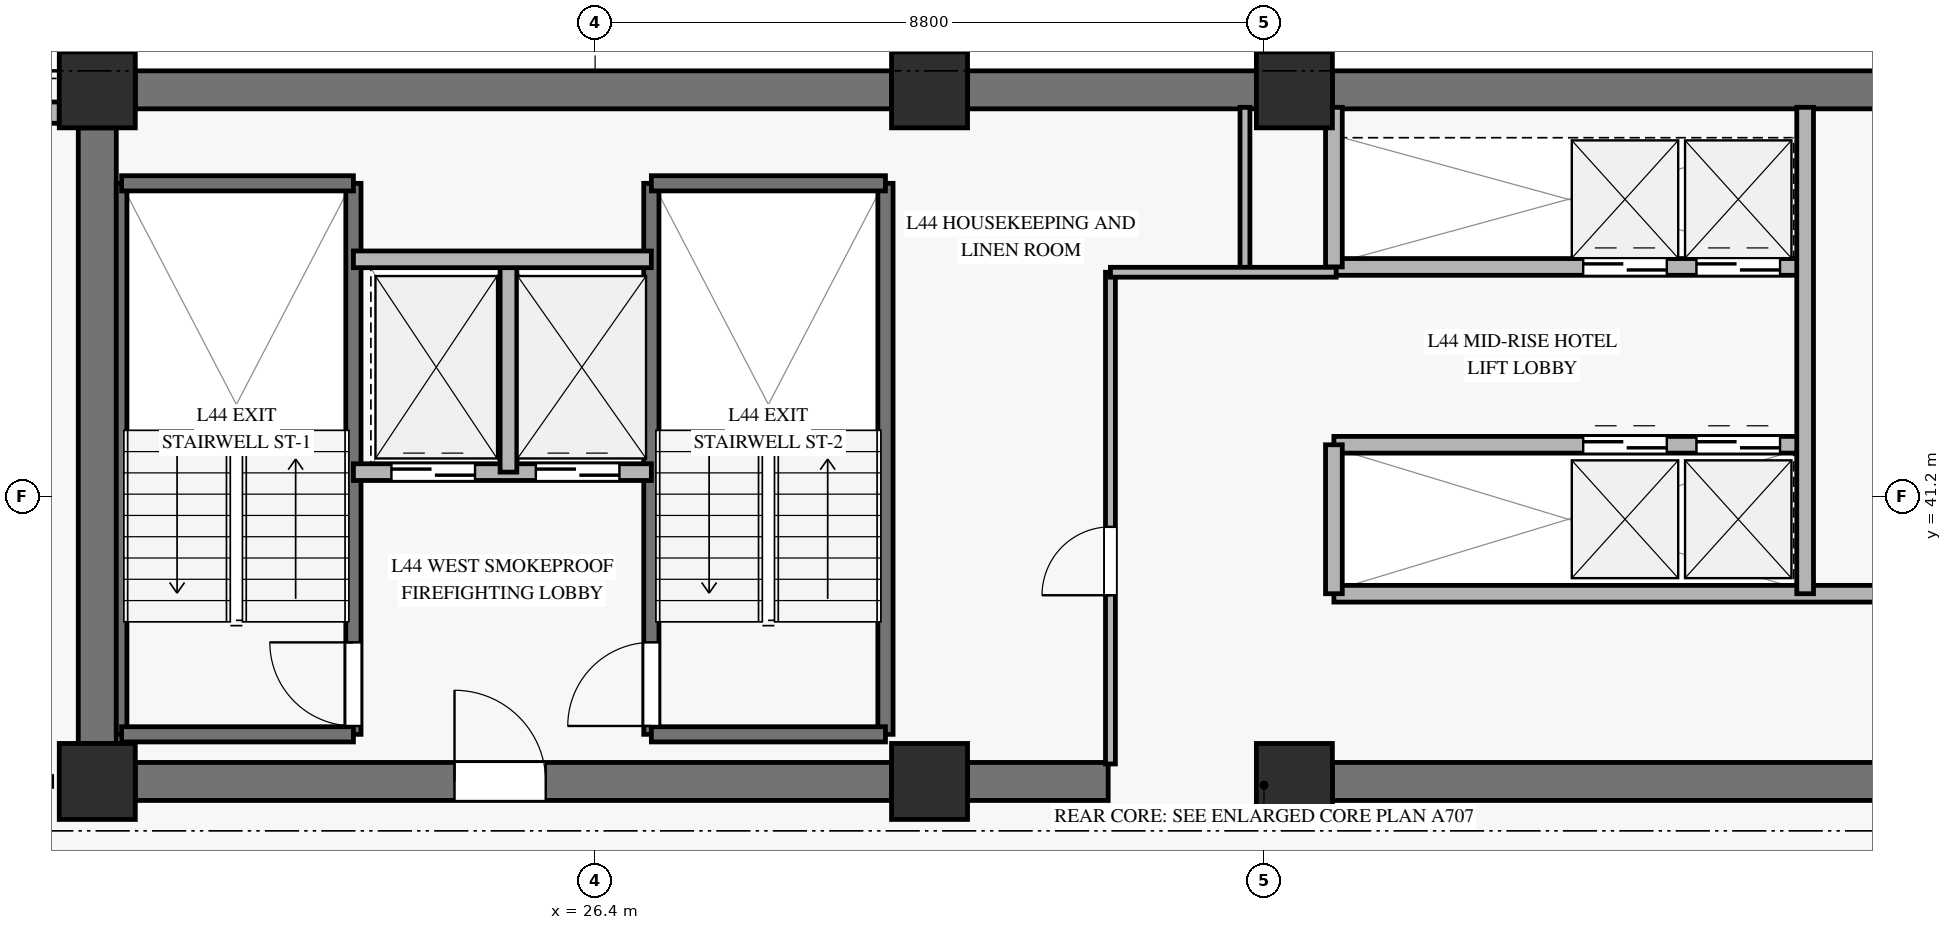
"""IFC4 building model, lengths in metres.
Left out: names, types, materials, properties, quantities, classifications, styles, units other than length and angle.
Written with IfcOpenShell. Run it as: python <this file> out.ifc"""

import sys

from ifc_helpers import new_model, si_unit, direction, frame, frame_2d, origin, origin_2d, place, context, subcontext, project, spatial, rectangle, extrude, source, transform, mapped, element, fill, save


model = new_model("IFC4")
c1 = context("Model", 3, precision=1e-05, world=origin(), true_north=direction((0.0, 1.0)))
c2 = subcontext(c1, "Body", "Model", "MODEL_VIEW")
j1 = project(units=[si_unit("LENGTHUNIT", "METRE"), si_unit("PLANEANGLEUNIT", "RADIAN")], contexts=[c1])
p1 = place(None, origin())
s1 = spatial("IfcSite", under=j1, at=p1, CompositionType="ELEMENT")
p2 = place(p1, origin())
s2 = spatial("IfcBuilding", under=s1, at=p2, CompositionType="ELEMENT")
p3 = place(p2, frame((0.0, 0.0, 177.2)))
s3 = spatial("IfcBuildingStorey", under=s2, at=p3, CompositionType="ELEMENT", Elevation=177.2)
m1 = source(origin(), c2, "Body", "SweptSolid", [
    extrude(rectangle(XDim=1.0, YDim=1.0, at=origin_2d()), origin(), (0.0, 0.0, 1.0), 3.27),
])
for number, where, z_axis, x_axis in (
    (1, (19.85, 37.45, 0.0), (0.0, 0.0, 1.0), (1.0, 0.0, 0.0)),
    (2, (19.85, 46.55, 0.0), (0.0, 0.0, 1.0), (1.0, 0.0, 0.0)),
    (3, (30.8, 37.45, 0.0), (0.0, 0.0, 1.0), (1.0, 0.0, 0.0)),
    (4, (30.8, 46.55, 0.0), (0.0, 0.0, 1.0), (1.0, 0.0, 0.0)),
    (5, (35.6, 37.45, 0.0), (0.0, 0.0, 1.0), (1.0, 0.0, 0.0)),
    (6, (35.6, 46.55, 0.0), (0.0, 0.0, 1.0), (1.0, 0.0, 0.0)),
):
    element("IfcColumn", number, at=place(p3, frame(where, z_axis=z_axis, x_axis=x_axis)), inside=s3, PredefinedType="PILASTER", context=c2, shape_type="MappedRepresentation", body=[
        mapped(m1, transform((0.0, 0.0, 0.0), x_axis=(1.0, 0.0, 0.0), y_axis=(0.0, 1.0, 0.0), z_axis=(0.0, 0.0, 1.0), scale=1.0)),
    ])
p4 = place(p3, frame((20.35, 46.55, 0.0), z_axis=(0.0, 0.0, 1.0), x_axis=(1.0, 0.0, 0.0)))
e7 = element("IfcWall", 7, at=p4, inside=s3, PredefinedType="SHEAR", context=c2, shape_type="SweptSolid", body=[
    extrude(rectangle(XDim=9.95, YDim=0.5, at=frame_2d((4.975, 0.0))), origin(), (0.0, 0.0, 1.0), 3.27),
])
p5 = place(p3, frame((31.3, 46.55, 0.0), z_axis=(0.0, 0.0, 1.0), x_axis=(1.0, 0.0, 0.0)))
e8 = element("IfcWall", 8, at=p5, inside=s3, PredefinedType="SHEAR", context=c2, shape_type="SweptSolid", body=[
    extrude(rectangle(XDim=3.8, YDim=0.5, at=frame_2d((1.9, 0.0))), origin(), (0.0, 0.0, 1.0), 3.27),
])
p6 = place(p3, frame((36.1, 46.55, 0.0), z_axis=(0.0, 0.0, 1.0), x_axis=(1.0, 0.0, 0.0)))
e9 = element("IfcWall", 9, at=p6, inside=s3, PredefinedType="SHEAR", context=c2, shape_type="SweptSolid", body=[
    extrude(rectangle(XDim=7.7, YDim=0.5, at=frame_2d((3.85, 0.0))), origin(), (0.0, 0.0, 1.0), 3.27),
])
p7 = place(p3, frame((20.35, 37.45, 0.0), z_axis=(0.0, 0.0, 1.0), x_axis=(1.0, 0.0, 0.0)))
e10 = element("IfcWall", 10, at=p7, inside=s3, PredefinedType="SHEAR", context=c2, shape_type="SweptSolid", body=[
    extrude(rectangle(XDim=9.95, YDim=0.5, at=frame_2d((4.975, 0.0))), origin(), (0.0, 0.0, 1.0), 3.27),
])
p8 = place(p7, frame((4.2, 0.0, 0.0)))
e11 = element("IfcOpeningElement", 11, at=p8, cuts=e10, PredefinedType="OPENING", context=c2, shape_type="SweptSolid", body=[
    extrude(rectangle(XDim=1.2, YDim=2.15, at=frame_2d((0.6, 1.075))), frame((0.0, 0.26, 0.0), z_axis=(0.0, -1.0, 0.0), x_axis=(1.0, 0.0, 0.0)), (0.0, 0.0, 1.0), 0.52),
])
p9 = place(p3, frame((31.3, 37.45, 0.0), z_axis=(0.0, 0.0, 1.0), x_axis=(1.0, 0.0, 0.0)))
e12 = element("IfcWall", 12, at=p9, inside=s3, PredefinedType="SHEAR", context=c2, shape_type="SweptSolid", body=[
    extrude(rectangle(XDim=1.85, YDim=0.5, at=frame_2d((0.925, 0.0))), origin(), (0.0, 0.0, 1.0), 3.27),
])
p10 = place(p3, frame((36.1, 37.45, 0.0), z_axis=(0.0, 0.0, 1.0), x_axis=(1.0, 0.0, 0.0)))
e13 = element("IfcWall", 13, at=p10, inside=s3, PredefinedType="SHEAR", context=c2, shape_type="SweptSolid", body=[
    extrude(rectangle(XDim=7.7, YDim=0.5, at=frame_2d((3.85, 0.0))), origin(), (0.0, 0.0, 1.0), 3.27),
])
p11 = place(p3, frame((19.85, 37.95, 0.0), z_axis=(0.0, 0.0, 1.0), x_axis=(0.0, 1.0, 0.0)))
e14 = element("IfcWall", 14, at=p11, inside=s3, PredefinedType="SHEAR", context=c2, shape_type="SweptSolid", body=[
    extrude(rectangle(XDim=8.1, YDim=0.5, at=frame_2d((4.05, 0.0))), origin(), (0.0, 0.0, 1.0), 3.27),
])
p12 = place(p3, frame((9.156, 46.25, 0.0), z_axis=(0.0, 0.0, 1.0), x_axis=(1.0, 0.0, 0.0)))
e15 = element("IfcWall", 15, at=p12, inside=s3, PredefinedType="SOLIDWALL", context=c2, shape_type="SweptSolid", body=[
    extrude(rectangle(XDim=10.194, YDim=0.28, at=frame_2d((5.097, 0.0))), origin(), (0.0, 0.0, 1.0), 2.75),
])
p13 = place(p12, frame((4.297, 0.0, 0.45)))
e16 = element("IfcOpeningElement", 16, at=p13, cuts=e15, PredefinedType="OPENING", context=c2, shape_type="SweptSolid", body=[
    extrude(rectangle(XDim=1.6, YDim=2.0, at=frame_2d((0.8, 1.0))), frame((0.0, 0.15, 0.0), z_axis=(0.0, -1.0, 0.0), x_axis=(1.0, 0.0, 0.0)), (0.0, 0.0, 1.0), 0.3),
])
p14 = place(p3, frame((20.17, 38.07, 0.0), z_axis=(0.0, 0.0, 1.0), x_axis=(0.0, 1.0, 0.0)))
e17 = element("IfcWall", 17, at=p14, inside=s3, PredefinedType="SOLIDWALL", context=c2, shape_type="SweptSolid", body=[
    extrude(rectangle(XDim=7.25, YDim=0.14, at=frame_2d((3.625, 0.0))), origin(), (0.0, 0.0, 1.0), 3.5),
])
p15 = place(p3, frame((23.22, 38.07, 0.0), z_axis=(0.0, 0.0, 1.0), x_axis=(0.0, 1.0, 0.0)))
e18 = element("IfcWall", 18, at=p15, inside=s3, PredefinedType="SOLIDWALL", context=c2, shape_type="SweptSolid", body=[
    extrude(rectangle(XDim=7.25, YDim=0.2, at=frame_2d((3.625, 0.0))), origin(), (0.0, 0.0, 1.0), 3.5),
])
p16 = place(p15, frame((0.11, 0.0, 0.0)))
e19 = element("IfcOpeningElement", 19, at=p16, cuts=e18, PredefinedType="OPENING", context=c2, shape_type="SweptSolid", body=[
    extrude(rectangle(XDim=1.1, YDim=2.15, at=frame_2d((0.55, 1.075))), frame((0.0, 0.11, 0.0), z_axis=(0.0, -1.0, 0.0), x_axis=(1.0, 0.0, 0.0)), (0.0, 0.0, 1.0), 0.22),
])
for number, where, z_axis, x_axis in (
    (20, (20.17, 45.32, 0.0), (0.0, 0.0, 1.0), (1.0, 0.0, 0.0)),
    (21, (20.17, 38.07, 0.0), (0.0, 0.0, 1.0), (1.0, 0.0, 0.0)),
):
    element("IfcWall", number, at=place(p3, frame(where, z_axis=z_axis, x_axis=x_axis)), inside=s3, PredefinedType="SOLIDWALL", context=c2, shape_type="SweptSolid", body=[
        extrude(rectangle(XDim=3.05, YDim=0.2, at=frame_2d((1.525, 0.0))), origin(), (0.0, 0.0, 1.0), 3.5),
    ])
p17 = place(p3, frame((27.14, 38.07, 0.0), z_axis=(0.0, 0.0, 1.0), x_axis=(0.0, 1.0, 0.0)))
e22 = element("IfcWall", 22, at=p17, inside=s3, PredefinedType="SOLIDWALL", context=c2, shape_type="SweptSolid", body=[
    extrude(rectangle(XDim=7.25, YDim=0.2, at=frame_2d((3.625, 0.0))), origin(), (0.0, 0.0, 1.0), 3.5),
])
p18 = place(p17, frame((0.11, 0.0, 0.0)))
e23 = element("IfcOpeningElement", 23, at=p18, cuts=e22, PredefinedType="OPENING", context=c2, shape_type="SweptSolid", body=[
    extrude(rectangle(XDim=1.1, YDim=2.15, at=frame_2d((0.55, 1.075))), frame((0.0, 0.11, 0.0), z_axis=(0.0, -1.0, 0.0), x_axis=(1.0, 0.0, 0.0)), (0.0, 0.0, 1.0), 0.22),
])
p19 = place(p3, frame((30.22, 38.07, 0.0), z_axis=(0.0, 0.0, 1.0), x_axis=(0.0, 1.0, 0.0)))
e24 = element("IfcWall", 24, at=p19, inside=s3, PredefinedType="SOLIDWALL", context=c2, shape_type="SweptSolid", body=[
    extrude(rectangle(XDim=7.25, YDim=0.2, at=frame_2d((3.625, 0.0))), origin(), (0.0, 0.0, 1.0), 3.5),
])
for number, where, z_axis, x_axis in (
    (25, (27.14, 45.32, 0.0), (0.0, 0.0, 1.0), (1.0, 0.0, 0.0)),
    (26, (27.14, 38.07, 0.0), (0.0, 0.0, 1.0), (1.0, 0.0, 0.0)),
):
    element("IfcWall", number, at=place(p3, frame(where, z_axis=z_axis, x_axis=x_axis)), inside=s3, PredefinedType="SOLIDWALL", context=c2, shape_type="SweptSolid", body=[
        extrude(rectangle(XDim=3.08, YDim=0.2, at=frame_2d((1.54, 0.0))), origin(), (0.0, 0.0, 1.0), 3.5),
    ])
p20 = place(p3, frame((23.22, 41.52, 0.0), z_axis=(0.0, 0.0, 1.0), x_axis=(1.0, 0.0, 0.0)))
e27 = element("IfcWall", 27, at=p20, inside=s3, PredefinedType="SOLIDWALL", context=c2, shape_type="SweptSolid", body=[
    extrude(rectangle(XDim=3.92, YDim=0.22, at=frame_2d((1.96, 0.0))), origin(), (0.0, 0.0, 1.0), 3.27),
])
p21 = place(p20, frame((0.5, 0.0, 0.0)))
e28 = element("IfcOpeningElement", 28, at=p21, cuts=e27, PredefinedType="OPENING", context=c2, shape_type="SweptSolid", body=[
    extrude(rectangle(XDim=1.1, YDim=2.2, at=frame_2d((0.55, 1.1))), frame((0.0, 0.12, 0.0), z_axis=(0.0, -1.0, 0.0), x_axis=(1.0, 0.0, 0.0)), (0.0, 0.0, 1.0), 0.24),
])
p22 = place(p20, frame((2.4, 0.0, 0.0)))
e29 = element("IfcOpeningElement", 29, at=p22, cuts=e27, PredefinedType="OPENING", context=c2, shape_type="SweptSolid", body=[
    extrude(rectangle(XDim=1.1, YDim=2.2, at=frame_2d((0.55, 1.1))), frame((0.0, 0.12, 0.0), z_axis=(0.0, -1.0, 0.0), x_axis=(1.0, 0.0, 0.0)), (0.0, 0.0, 1.0), 0.24),
])
p23 = place(p3, frame((25.26, 41.52, 0.0), z_axis=(0.0, 0.0, 1.0), x_axis=(0.0, 1.0, 0.0)))
e30 = element("IfcWall", 30, at=p23, inside=s3, PredefinedType="SOLIDWALL", context=c2, shape_type="SweptSolid", body=[
    extrude(rectangle(XDim=2.8, YDim=0.22, at=frame_2d((1.4, 0.0))), origin(), (0.0, 0.0, 1.0), 3.27),
])
p24 = place(p3, frame((23.22, 44.32, 0.0), z_axis=(0.0, 0.0, 1.0), x_axis=(1.0, 0.0, 0.0)))
e31 = element("IfcWall", 31, at=p24, inside=s3, PredefinedType="SOLIDWALL", context=c2, shape_type="SweptSolid", body=[
    extrude(rectangle(XDim=3.92, YDim=0.22, at=frame_2d((1.96, 0.0))), origin(), (0.0, 0.0, 1.0), 3.27),
])
p25 = place(p3, frame((36.12, 44.22, 0.0), z_axis=(0.0, 0.0, 1.0), x_axis=(1.0, 0.0, 0.0)))
e32 = element("IfcWall", 32, at=p25, inside=s3, PredefinedType="SOLIDWALL", context=c2, shape_type="SweptSolid", body=[
    extrude(rectangle(XDim=6.2, YDim=0.22, at=frame_2d((3.1, 0.0))), origin(), (0.0, 0.0, 1.0), 3.27),
])
p26 = place(p25, frame((3.28, 0.0, 0.0)))
e33 = element("IfcOpeningElement", 33, at=p26, cuts=e32, PredefinedType="OPENING", context=c2, shape_type="SweptSolid", body=[
    extrude(rectangle(XDim=1.1, YDim=2.2, at=frame_2d((0.55, 1.1))), frame((0.0, 0.12, 0.0), z_axis=(0.0, -1.0, 0.0), x_axis=(1.0, 0.0, 0.0)), (0.0, 0.0, 1.0), 0.24),
])
p27 = place(p25, frame((4.77, 0.0, 0.0)))
e34 = element("IfcOpeningElement", 34, at=p27, cuts=e32, PredefinedType="OPENING", context=c2, shape_type="SweptSolid", body=[
    extrude(rectangle(XDim=1.1, YDim=2.2, at=frame_2d((0.55, 1.1))), frame((0.0, 0.12, 0.0), z_axis=(0.0, -1.0, 0.0), x_axis=(1.0, 0.0, 0.0)), (0.0, 0.0, 1.0), 0.24),
])
p28 = place(p3, frame((36.12, 41.88, 0.0), z_axis=(0.0, 0.0, 1.0), x_axis=(1.0, 0.0, 0.0)))
e35 = element("IfcWall", 35, at=p28, inside=s3, PredefinedType="SOLIDWALL", context=c2, shape_type="SweptSolid", body=[
    extrude(rectangle(XDim=6.2, YDim=0.22, at=frame_2d((3.1, 0.0))), origin(), (0.0, 0.0, 1.0), 3.27),
])
p29 = place(p28, frame((3.28, 0.0, 0.0)))
e36 = element("IfcOpeningElement", 36, at=p29, cuts=e35, PredefinedType="OPENING", context=c2, shape_type="SweptSolid", body=[
    extrude(rectangle(XDim=1.1, YDim=2.2, at=frame_2d((0.55, 1.1))), frame((0.0, 0.12, 0.0), z_axis=(0.0, -1.0, 0.0), x_axis=(1.0, 0.0, 0.0)), (0.0, 0.0, 1.0), 0.24),
])
p30 = place(p28, frame((4.77, 0.0, 0.0)))
e37 = element("IfcOpeningElement", 37, at=p30, cuts=e35, PredefinedType="OPENING", context=c2, shape_type="SweptSolid", body=[
    extrude(rectangle(XDim=1.1, YDim=2.2, at=frame_2d((0.55, 1.1))), frame((0.0, 0.12, 0.0), z_axis=(0.0, -1.0, 0.0), x_axis=(1.0, 0.0, 0.0)), (0.0, 0.0, 1.0), 0.24),
])
p31 = place(p3, frame((36.12, 39.92, 0.0), z_axis=(0.0, 0.0, 1.0), x_axis=(1.0, 0.0, 0.0)))
e38 = element("IfcWall", 38, at=p31, inside=s3, PredefinedType="SOLIDWALL", context=c2, shape_type="SweptSolid", body=[
    extrude(rectangle(XDim=8.6, YDim=0.22, at=frame_2d((4.3, 0.0))), origin(), (0.0, 0.0, 1.0), 2.555),
])
p32 = place(p3, frame((42.32, 39.92, 0.0), z_axis=(0.0, 0.0, 1.0), x_axis=(0.0, 1.0, 0.0)))
e39 = element("IfcWall", 39, at=p32, inside=s3, PredefinedType="SOLIDWALL", context=c2, shape_type="SweptSolid", body=[
    extrude(rectangle(XDim=6.4, YDim=0.22, at=frame_2d((3.2, 0.0))), origin(), (0.0, 0.0, 1.0), 3.27),
])
p33 = place(p3, frame((36.12, 39.92, 0.0), z_axis=(0.0, 0.0, 1.0), x_axis=(0.0, 1.0, 0.0)))
e40 = element("IfcWall", 40, at=p33, inside=s3, PredefinedType="SOLIDWALL", context=c2, shape_type="SweptSolid", body=[
    extrude(rectangle(XDim=1.96, YDim=0.22, at=frame_2d((0.98, 0.0))), origin(), (0.0, 0.0, 1.0), 3.27),
])
p34 = place(p3, frame((36.12, 44.22, 0.0), z_axis=(0.0, 0.0, 1.0), x_axis=(0.0, 1.0, 0.0)))
e41 = element("IfcWall", 41, at=p34, inside=s3, PredefinedType="SOLIDWALL", context=c2, shape_type="SweptSolid", body=[
    extrude(rectangle(XDim=2.1, YDim=0.22, at=frame_2d((1.05, 0.0))), origin(), (0.0, 0.0, 1.0), 3.27),
])
p35 = place(p3, frame((33.18, 37.68, 0.0), z_axis=(0.0, 0.0, 1.0), x_axis=(0.0, 1.0, 0.0)))
e42 = element("IfcWall", 42, at=p35, inside=s3, PredefinedType="PARTITIONING", context=c2, shape_type="SweptSolid", body=[
    extrude(rectangle(XDim=6.47, YDim=0.13, at=frame_2d((3.235, 0.0))), origin(), (0.0, 0.0, 1.0), 2.355),
])
p36 = place(p35, frame((2.22, 0.0, 0.0)))
e43 = element("IfcOpeningElement", 43, at=p36, cuts=e42, PredefinedType="OPENING", context=c2, shape_type="SweptSolid", body=[
    extrude(rectangle(XDim=0.9, YDim=2.1, at=frame_2d((0.45, 1.05))), frame((0.0, 0.075, 0.0), z_axis=(0.0, -1.0, 0.0), x_axis=(1.0, 0.0, 0.0)), (0.0, 0.0, 1.0), 0.15),
])
p37 = place(p3, frame((34.95, 44.15, 0.0), z_axis=(0.0, 0.0, 1.0), x_axis=(0.0, 1.0, 0.0)))
e44 = element("IfcWall", 44, at=p37, inside=s3, PredefinedType="PARTITIONING", context=c2, shape_type="SweptSolid", body=[
    extrude(rectangle(XDim=2.17, YDim=0.13, at=frame_2d((1.085, 0.0))), origin(), (0.0, 0.0, 1.0), 3.27),
])
p38 = place(p3, frame((33.18, 44.15, 0.0), z_axis=(0.0, 0.0, 1.0), x_axis=(1.0, 0.0, 0.0)))
e45 = element("IfcWall", 45, at=p38, inside=s3, PredefinedType="PARTITIONING", context=c2, shape_type="SweptSolid", body=[
    extrude(rectangle(XDim=2.97, YDim=0.13, at=frame_2d((1.485, 0.0))), origin(), (0.0, 0.0, 1.0), 2.555),
])
m2 = source(origin(), c2, "Body", "SweptSolid", [
    extrude(rectangle(XDim=1.1, YDim=2.15, at=frame_2d((0.55, 1.075))), frame((0.0, 0.025, 0.0), z_axis=(0.0, -1.0, 0.0), x_axis=(1.0, 0.0, 0.0)), (0.0, 0.0, 1.0), 0.05),
])
p39 = place(p16, origin())
e46 = element("IfcDoor", 46, at=p39, inside=s3, OperationType="SINGLE_SWING_RIGHT", PredefinedType="DOOR", context=c2, shape_type="MappedRepresentation", body=[
    mapped(m2, transform((0.0, 0.0, 0.0), x_axis=(1.0, 0.0, 0.0), y_axis=(0.0, 1.0, 0.0), z_axis=(0.0, 0.0, 1.0), scale=1.0)),
])
fill(e19, e46)
p40 = place(p18, origin())
e47 = element("IfcDoor", 47, at=p40, inside=s3, OperationType="SINGLE_SWING_LEFT", PredefinedType="DOOR", context=c2, shape_type="MappedRepresentation", body=[
    mapped(m2, transform((0.0, 0.0, 0.0), x_axis=(1.0, 0.0, 0.0), y_axis=(0.0, 1.0, 0.0), z_axis=(0.0, 0.0, 1.0), scale=1.0)),
])
fill(e23, e47)
m3 = source(origin(), c2, "Body", "SweptSolid", [
    extrude(rectangle(XDim=1.1, YDim=2.2, at=frame_2d((0.55, 1.1))), frame((0.0, 0.025, 0.0), z_axis=(0.0, -1.0, 0.0), x_axis=(1.0, 0.0, 0.0)), (0.0, 0.0, 1.0), 0.05),
])
p41 = place(p21, origin())
e48 = element("IfcDoor", 48, at=p41, inside=s3, OperationType="SLIDING_TO_LEFT", PredefinedType="DOOR", context=c2, shape_type="MappedRepresentation", body=[
    mapped(m3, transform((0.0, 0.0, 0.0), x_axis=(1.0, 0.0, 0.0), y_axis=(0.0, 1.0, 0.0), z_axis=(0.0, 0.0, 1.0), scale=1.0)),
])
fill(e28, e48)
p42 = place(p22, origin())
e49 = element("IfcDoor", 49, at=p42, inside=s3, OperationType="SLIDING_TO_LEFT", PredefinedType="DOOR", context=c2, shape_type="MappedRepresentation", body=[
    mapped(m3, transform((0.0, 0.0, 0.0), x_axis=(1.0, 0.0, 0.0), y_axis=(0.0, 1.0, 0.0), z_axis=(0.0, 0.0, 1.0), scale=1.0)),
])
fill(e29, e49)
m4 = source(origin(), c2, "Body", "SweptSolid", [
    extrude(rectangle(XDim=1.2, YDim=2.15, at=frame_2d((0.6, 1.075))), frame((0.0, 0.025, 0.0), z_axis=(0.0, -1.0, 0.0), x_axis=(1.0, 0.0, 0.0)), (0.0, 0.0, 1.0), 0.05),
])
p43 = place(p8, origin())
e50 = element("IfcDoor", 50, at=p43, inside=s3, OperationType="SINGLE_SWING_LEFT", PredefinedType="DOOR", context=c2, shape_type="MappedRepresentation", body=[
    mapped(m4, transform((0.0, 0.0, 0.0), x_axis=(1.0, 0.0, 0.0), y_axis=(0.0, 1.0, 0.0), z_axis=(0.0, 0.0, 1.0), scale=1.0)),
])
fill(e11, e50)
p44 = place(p26, origin())
e51 = element("IfcDoor", 51, at=p44, inside=s3, OperationType="SLIDING_TO_LEFT", PredefinedType="DOOR", context=c2, shape_type="MappedRepresentation", body=[
    mapped(m3, transform((0.0, 0.0, 0.0), x_axis=(1.0, 0.0, 0.0), y_axis=(0.0, 1.0, 0.0), z_axis=(0.0, 0.0, 1.0), scale=1.0)),
])
fill(e33, e51)
p45 = place(p27, origin())
e52 = element("IfcDoor", 52, at=p45, inside=s3, OperationType="SLIDING_TO_LEFT", PredefinedType="DOOR", context=c2, shape_type="MappedRepresentation", body=[
    mapped(m3, transform((0.0, 0.0, 0.0), x_axis=(1.0, 0.0, 0.0), y_axis=(0.0, 1.0, 0.0), z_axis=(0.0, 0.0, 1.0), scale=1.0)),
])
fill(e34, e52)
p46 = place(p29, origin())
e53 = element("IfcDoor", 53, at=p46, inside=s3, OperationType="SLIDING_TO_LEFT", PredefinedType="DOOR", context=c2, shape_type="MappedRepresentation", body=[
    mapped(m3, transform((0.0, 0.0, 0.0), x_axis=(1.0, 0.0, 0.0), y_axis=(0.0, 1.0, 0.0), z_axis=(0.0, 0.0, 1.0), scale=1.0)),
])
fill(e36, e53)
p47 = place(p30, origin())
e54 = element("IfcDoor", 54, at=p47, inside=s3, OperationType="SLIDING_TO_LEFT", PredefinedType="DOOR", context=c2, shape_type="MappedRepresentation", body=[
    mapped(m3, transform((0.0, 0.0, 0.0), x_axis=(1.0, 0.0, 0.0), y_axis=(0.0, 1.0, 0.0), z_axis=(0.0, 0.0, 1.0), scale=1.0)),
])
fill(e37, e54)
m5 = source(origin(), c2, "Body", "SweptSolid", [
    extrude(rectangle(XDim=0.9, YDim=2.1, at=frame_2d((0.45, 1.05))), frame((0.0, 0.025, 0.0), z_axis=(0.0, -1.0, 0.0), x_axis=(1.0, 0.0, 0.0)), (0.0, 0.0, 1.0), 0.05),
])
p48 = place(p36, origin())
e55 = element("IfcDoor", 55, at=p48, inside=s3, OperationType="SINGLE_SWING_LEFT", PredefinedType="DOOR", context=c2, shape_type="MappedRepresentation", body=[
    mapped(m5, transform((0.0, 0.0, 0.0), x_axis=(1.0, 0.0, 0.0), y_axis=(0.0, 1.0, 0.0), z_axis=(0.0, 0.0, 1.0), scale=1.0)),
])
fill(e43, e55)
save(model, sys.argv[1])
